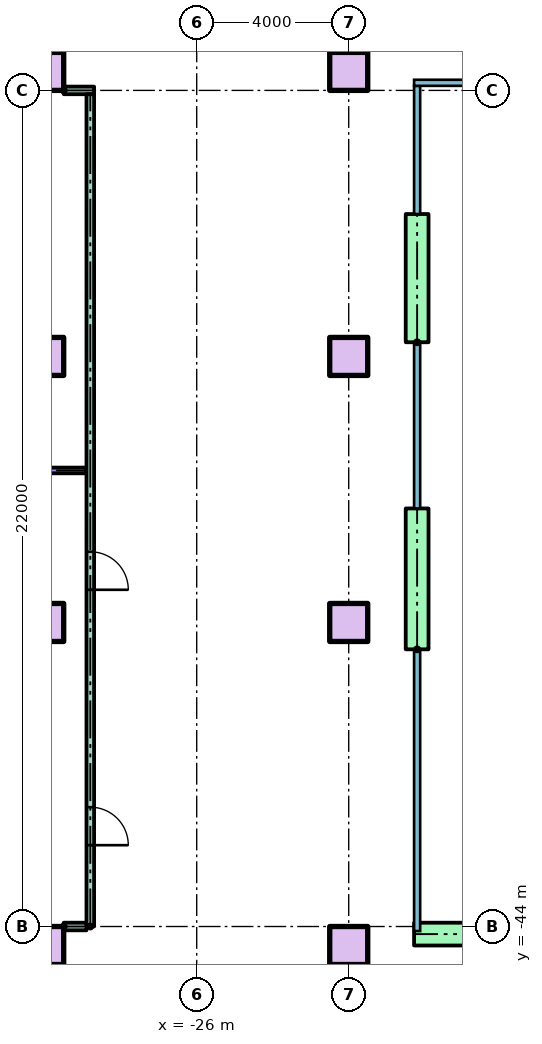
"""IFC4 building model, lengths in metres.
Left out: names, types, materials, properties, quantities, classifications, styles, units other than length and angle.
Written with IfcOpenShell. Run it as: python <this file> out.ifc"""

import sys

from ifc_helpers import new_model, si_unit, direction, frame, frame_2d, origin, origin_2d, place, context, subcontext, project, spatial, rectangle, extrude, element, fill, save


model = new_model("IFC4")
c1 = context("Model", 3, precision=1e-05, world=origin(), true_north=direction((0.0, 1.0)))
c2 = subcontext(c1, "Body", "Model", "MODEL_VIEW")
j1 = project(units=[si_unit("LENGTHUNIT", "METRE"), si_unit("PLANEANGLEUNIT", "RADIAN")], contexts=[c1])
p1 = place(None, origin())
s1 = spatial("IfcSite", under=j1, at=p1, CompositionType="ELEMENT")
p2 = place(p1, origin())
s2 = spatial("IfcBuilding", under=s1, at=p2, CompositionType="ELEMENT")
p3 = place(p2, frame((0.0, 0.0, 6.0)))
s3 = spatial("IfcBuildingStorey", under=s2, at=p3, CompositionType="ELEMENT", Elevation=6.0)
for number, where in (
    (1, (-30.0, -44.5, 0.0)),
    (2, (-22.0, -44.5, 0.0)),
    (3, (-30.0, -36.0, 0.0)),
    (4, (-22.0, -36.0, 0.0)),
    (5, (-30.0, -29.0, 0.0)),
    (6, (-22.0, -29.0, 0.0)),
    (7, (-30.0, -21.5, 0.0)),
    (8, (-22.0, -21.5, 0.0)),
):
    element("IfcColumn", number, at=place(p3, frame(where)), inside=s3, PredefinedType="COLUMN", context=c2, shape_type="SweptSolid", body=[
        extrude(rectangle(XDim=1.0, YDim=1.0, at=origin_2d()), origin(), (0.0, 0.0, 1.0), 4.0),
    ])
p4 = place(p3, frame((-18.0, -44.2, 0.0), z_axis=(0.0, 0.0, 1.0), x_axis=(-1.0, 0.0, 0.0)))
e9 = element("IfcWall", 9, at=p4, inside=s3, PredefinedType="STANDARD", context=c2, shape_type="SweptSolid", body=[
    extrude(rectangle(XDim=2.28, YDim=0.6, at=frame_2d((1.14, 0.0))), origin(), (0.0, 0.0, 1.0), 3.7),
])
p5 = place(p3, frame((-20.2, -36.707, 0.0), z_axis=(0.0, 0.0, 1.0), x_axis=(0.0, 1.0, 0.0)))
e10 = element("IfcWall", 10, at=p5, inside=s3, PredefinedType="STANDARD", context=c2, shape_type="SweptSolid", body=[
    extrude(rectangle(XDim=3.707, YDim=0.6, at=frame_2d((1.854, 0.0))), origin(), (0.0, 0.0, 1.0), 3.7),
])
p6 = place(p3, frame((-20.2, -28.627, 0.0), z_axis=(0.0, 0.0, 1.0), x_axis=(0.0, 1.0, 0.0)))
e11 = element("IfcWall", 11, at=p6, inside=s3, PredefinedType="STANDARD", context=c2, shape_type="SweptSolid", body=[
    extrude(rectangle(XDim=3.373, YDim=0.6, at=frame_2d((1.687, 0.0))), origin(), (0.0, 0.0, 1.0), 3.7),
])
p7 = place(p3, frame((-29.5, -44.0, 0.0)))
e12 = element("IfcWall", 12, at=p7, inside=s3, PredefinedType="PARTITIONING", context=c2, shape_type="SweptSolid", body=[
    extrude(rectangle(XDim=0.6, YDim=0.2, at=frame_2d((0.3, 0.0))), origin(), (0.0, 0.0, 1.0), 3.7),
])
p8 = place(p3, frame((-39.6, -32.0, 0.0)))
e13 = element("IfcWall", 13, at=p8, inside=s3, PredefinedType="PARTITIONING", context=c2, shape_type="SweptSolid", body=[
    extrude(rectangle(XDim=10.7, YDim=0.15, at=frame_2d((5.35, 0.0))), origin(), (0.0, 0.0, 1.0), 3.7),
])
p9 = place(p3, frame((-29.5, -22.0, 0.0)))
e14 = element("IfcWall", 14, at=p9, inside=s3, PredefinedType="PARTITIONING", context=c2, shape_type="SweptSolid", body=[
    extrude(rectangle(XDim=0.8, YDim=0.2, at=frame_2d((0.4, 0.0))), origin(), (0.0, 0.0, 1.0), 3.7),
])
p10 = place(p3, frame((-28.8, -44.0, 0.0), z_axis=(0.0, 0.0, 1.0), x_axis=(0.0, 1.0, 0.0)))
e15 = element("IfcWall", 15, at=p10, inside=s3, PredefinedType="PARTITIONING", context=c2, shape_type="SweptSolid", body=[
    extrude(rectangle(XDim=21.9, YDim=0.2, at=frame_2d((10.95, 0.0))), origin(), (0.0, 0.0, 1.0), 3.7),
])
p11 = place(p10, frame((2.14, 0.0, 0.0)))
e16 = element("IfcOpeningElement", 16, at=p11, cuts=e15, PredefinedType="OPENING", context=c2, shape_type="SweptSolid", body=[
    extrude(rectangle(XDim=1.0, YDim=2.1, at=frame_2d((0.5, 1.05))), frame((0.0, 0.11, 0.0), z_axis=(0.0, -1.0, 0.0), x_axis=(1.0, 0.0, 0.0)), (0.0, 0.0, 1.0), 0.22),
])
p12 = place(p10, frame((8.86, 0.0, 0.0)))
e17 = element("IfcOpeningElement", 17, at=p12, cuts=e15, PredefinedType="OPENING", context=c2, shape_type="SweptSolid", body=[
    extrude(rectangle(XDim=1.0, YDim=2.1, at=frame_2d((0.5, 1.05))), frame((0.0, 0.11, 0.0), z_axis=(0.0, -1.0, 0.0), x_axis=(1.0, 0.0, 0.0)), (0.0, 0.0, 1.0), 0.22),
])
p13 = place(p11, frame((1.0, 0.0, 0.0), z_axis=(0.0, 0.0, 1.0), x_axis=(-1.0, 0.0, 0.0)))
e18 = element("IfcDoor", 18, at=p13, inside=s3, OperationType="SINGLE_SWING_LEFT", PredefinedType="DOOR", context=c2, shape_type="SweptSolid", body=[
    extrude(rectangle(XDim=1.0, YDim=2.1, at=frame_2d((0.5, 1.05))), frame((0.0, 0.025, 0.0), z_axis=(0.0, -1.0, 0.0), x_axis=(1.0, 0.0, 0.0)), (0.0, 0.0, 1.0), 0.05),
])
fill(e16, e18)
p14 = place(p12, frame((1.0, 0.0, 0.0), z_axis=(0.0, 0.0, 1.0), x_axis=(-1.0, 0.0, 0.0)))
e19 = element("IfcDoor", 19, at=p14, inside=s3, OperationType="SINGLE_SWING_LEFT", PredefinedType="DOOR", context=c2, shape_type="SweptSolid", body=[
    extrude(rectangle(XDim=1.0, YDim=2.1, at=frame_2d((0.5, 1.05))), frame((0.0, 0.025, 0.0), z_axis=(0.0, -1.0, 0.0), x_axis=(1.0, 0.0, 0.0)), (0.0, 0.0, 1.0), 0.05),
])
fill(e17, e19)
save(model, sys.argv[1])
